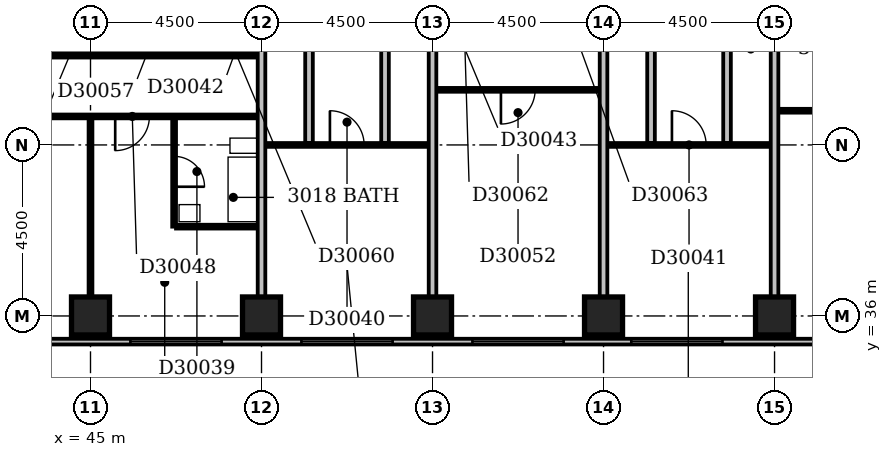
"""IFC4 building model, lengths in metres.
Left out: names, types, materials, properties, quantities, classifications, styles, units other than length and angle.
Written with IfcOpenShell. Run it as: python <this file> out.ifc"""

import sys

from ifc_helpers import new_model, si_unit, direction, frame, frame_2d, origin, origin_2d, place, context, subcontext, project, spatial, rectangle, extrude, element, fill, save


model = new_model("IFC4")
c1 = context("Model", 3, precision=1e-05, world=origin(), true_north=direction((0.0, 1.0)))
c2 = subcontext(c1, "Body", "Model", "MODEL_VIEW")
j1 = project(units=[si_unit("LENGTHUNIT", "METRE"), si_unit("PLANEANGLEUNIT", "RADIAN")], contexts=[c1])
p1 = place(None, origin())
s1 = spatial("IfcSite", under=j1, at=p1, CompositionType="ELEMENT")
p2 = place(p1, origin())
s2 = spatial("IfcBuilding", under=s1, at=p2, CompositionType="ELEMENT")
p3 = place(p2, frame((0.0, 0.0, 123.2)))
s3 = spatial("IfcBuildingStorey", under=s2, at=p3, CompositionType="ELEMENT", Elevation=123.2)
for number, where, z_axis, x_axis in (
    (1, (45.0, 36.0, -0.3), (0.0, 0.0, 1.0), (1.0, 0.0, 0.0)),
    (2, (49.5, 36.0, -0.3), (0.0, 0.0, 1.0), (1.0, 0.0, 0.0)),
    (3, (54.0, 36.0, -0.3), (0.0, 0.0, 1.0), (1.0, 0.0, 0.0)),
    (4, (58.5, 36.0, -0.3), (0.0, 0.0, 1.0), (1.0, 0.0, 0.0)),
    (5, (63.0, 36.0, -0.3), (0.0, 0.0, 1.0), (1.0, 0.0, 0.0)),
):
    element("IfcColumn", number, at=place(p3, frame(where, z_axis=z_axis, x_axis=x_axis)), inside=s3, PredefinedType="COLUMN", context=c2, shape_type="SweptSolid", body=[
        extrude(rectangle(XDim=1.0, YDim=1.0, at=origin_2d()), origin(), (0.0, 0.0, 1.0), 3.6),
    ])
p4 = place(p3, frame((23.1, 35.325, 0.0), z_axis=(0.0, 0.0, 1.0), x_axis=(1.0, 0.0, 0.0)))
e6 = element("IfcWall", 6, at=p4, inside=s3, PredefinedType="STANDARD", context=c2, shape_type="SweptSolid", body=[
    extrude(rectangle(XDim=45.15, YDim=0.15, at=frame_2d((22.575, 0.0))), origin(), (0.0, 0.0, 1.0), 2.7),
])
p5 = place(p4, frame((0.45, 0.0, 0.6)))
e7 = element("IfcOpeningElement", 7, at=p5, cuts=e6, PredefinedType="OPENING", context=c2, shape_type="SweptSolid", body=[
    extrude(rectangle(XDim=2.4, YDim=1.8, at=frame_2d((1.2, 0.9))), frame((0.0, 0.087, 0.0), z_axis=(0.0, -1.0, 0.0), x_axis=(1.0, 0.0, 0.0)), (0.0, 0.0, 1.0), 0.174),
])
p6 = place(p4, frame((4.95, 0.0, 0.6)))
e8 = element("IfcOpeningElement", 8, at=p6, cuts=e6, PredefinedType="OPENING", context=c2, shape_type="SweptSolid", body=[
    extrude(rectangle(XDim=2.4, YDim=1.8, at=frame_2d((1.2, 0.9))), frame((0.0, 0.087, 0.0), z_axis=(0.0, -1.0, 0.0), x_axis=(1.0, 0.0, 0.0)), (0.0, 0.0, 1.0), 0.174),
])
p7 = place(p4, frame((10.598, 0.0, 0.6)))
e9 = element("IfcOpeningElement", 9, at=p7, cuts=e6, PredefinedType="OPENING", context=c2, shape_type="SweptSolid", body=[
    extrude(rectangle(XDim=1.5, YDim=1.8, at=frame_2d((0.75, 0.9))), frame((0.0, 0.087, 0.0), z_axis=(0.0, -1.0, 0.0), x_axis=(1.0, 0.0, 0.0)), (0.0, 0.0, 1.0), 0.174),
])
p8 = place(p4, frame((13.66, 0.0, 0.6)))
e10 = element("IfcOpeningElement", 10, at=p8, cuts=e6, PredefinedType="OPENING", context=c2, shape_type="SweptSolid", body=[
    extrude(rectangle(XDim=1.8, YDim=1.8, at=frame_2d((0.9, 0.9))), frame((0.0, 0.087, 0.0), z_axis=(0.0, -1.0, 0.0), x_axis=(1.0, 0.0, 0.0)), (0.0, 0.0, 1.0), 0.174),
])
p9 = place(p4, frame((18.45, 0.0, 0.6)))
e11 = element("IfcOpeningElement", 11, at=p9, cuts=e6, PredefinedType="OPENING", context=c2, shape_type="SweptSolid", body=[
    extrude(rectangle(XDim=2.4, YDim=1.8, at=frame_2d((1.2, 0.9))), frame((0.0, 0.087, 0.0), z_axis=(0.0, -1.0, 0.0), x_axis=(1.0, 0.0, 0.0)), (0.0, 0.0, 1.0), 0.174),
])
p10 = place(p4, frame((22.95, 0.0, 0.6)))
e12 = element("IfcOpeningElement", 12, at=p10, cuts=e6, PredefinedType="OPENING", context=c2, shape_type="SweptSolid", body=[
    extrude(rectangle(XDim=2.4, YDim=1.8, at=frame_2d((1.2, 0.9))), frame((0.0, 0.087, 0.0), z_axis=(0.0, -1.0, 0.0), x_axis=(1.0, 0.0, 0.0)), (0.0, 0.0, 1.0), 0.174),
])
p11 = place(p4, frame((27.45, 0.0, 0.6)))
e13 = element("IfcOpeningElement", 13, at=p11, cuts=e6, PredefinedType="OPENING", context=c2, shape_type="SweptSolid", body=[
    extrude(rectangle(XDim=2.4, YDim=1.8, at=frame_2d((1.2, 0.9))), frame((0.0, 0.087, 0.0), z_axis=(0.0, -1.0, 0.0), x_axis=(1.0, 0.0, 0.0)), (0.0, 0.0, 1.0), 0.174),
])
p12 = place(p4, frame((31.95, 0.0, 0.6)))
e14 = element("IfcOpeningElement", 14, at=p12, cuts=e6, PredefinedType="OPENING", context=c2, shape_type="SweptSolid", body=[
    extrude(rectangle(XDim=2.4, YDim=1.8, at=frame_2d((1.2, 0.9))), frame((0.0, 0.087, 0.0), z_axis=(0.0, -1.0, 0.0), x_axis=(1.0, 0.0, 0.0)), (0.0, 0.0, 1.0), 0.174),
])
p13 = place(p4, frame((36.131, 0.0, 0.6)))
e15 = element("IfcOpeningElement", 15, at=p13, cuts=e6, PredefinedType="OPENING", context=c2, shape_type="SweptSolid", body=[
    extrude(rectangle(XDim=2.4, YDim=1.8, at=frame_2d((1.2, 0.9))), frame((0.0, 0.087, 0.0), z_axis=(0.0, -1.0, 0.0), x_axis=(1.0, 0.0, 0.0)), (0.0, 0.0, 1.0), 0.174),
])
p14 = place(p4, frame((40.95, 0.0, 0.6)))
e16 = element("IfcOpeningElement", 16, at=p14, cuts=e6, PredefinedType="OPENING", context=c2, shape_type="SweptSolid", body=[
    extrude(rectangle(XDim=2.4, YDim=1.8, at=frame_2d((1.2, 0.9))), frame((0.0, 0.087, 0.0), z_axis=(0.0, -1.0, 0.0), x_axis=(1.0, 0.0, 0.0)), (0.0, 0.0, 1.0), 0.174),
])
p15 = place(p3, frame((45.0, 36.5, 0.0), z_axis=(0.0, 0.0, 1.0), x_axis=(0.0, 1.0, 0.0)))
e17 = element("IfcWall", 17, at=p15, inside=s3, PredefinedType="PARTITIONING", context=c2, shape_type="SweptSolid", body=[
    extrude(rectangle(XDim=4.7, YDim=0.1, at=frame_2d((2.35, 0.0))), origin(), (0.0, 0.0, 1.0), 2.6),
])
p16 = place(p3, frame((49.5, 36.5, 0.0), z_axis=(0.0, 0.0, 1.0), x_axis=(0.0, 1.0, 0.0)))
e18 = element("IfcWall", 18, at=p16, inside=s3, PredefinedType="PARTITIONING", context=c2, shape_type="SweptSolid", body=[
    extrude(rectangle(XDim=12.9, YDim=0.2, at=frame_2d((6.45, 0.0))), origin(), (0.0, 0.0, 1.0), 3.3),
])
p17 = place(p3, frame((54.0, 36.5, 0.0), z_axis=(0.0, 0.0, 1.0), x_axis=(0.0, 1.0, 0.0)))
e19 = element("IfcWall", 19, at=p17, inside=s3, PredefinedType="PARTITIONING", context=c2, shape_type="SweptSolid", body=[
    extrude(rectangle(XDim=12.9, YDim=0.2, at=frame_2d((6.45, 0.0))), origin(), (0.0, 0.0, 1.0), 2.6),
])
p18 = place(p3, frame((58.5, 36.5, 0.0), z_axis=(0.0, 0.0, 1.0), x_axis=(0.0, 1.0, 0.0)))
e20 = element("IfcWall", 20, at=p18, inside=s3, PredefinedType="PARTITIONING", context=c2, shape_type="SweptSolid", body=[
    extrude(rectangle(XDim=12.9, YDim=0.2, at=frame_2d((6.45, 0.0))), origin(), (0.0, 0.0, 1.0), 3.3),
])
p19 = place(p3, frame((63.0, 36.5, 0.0), z_axis=(0.0, 0.0, 1.0), x_axis=(0.0, 1.0, 0.0)))
e21 = element("IfcWall", 21, at=p19, inside=s3, PredefinedType="PARTITIONING", context=c2, shape_type="SweptSolid", body=[
    extrude(rectangle(XDim=12.9, YDim=0.2, at=frame_2d((6.45, 0.0))), origin(), (0.0, 0.0, 1.0), 2.4),
])
p20 = place(p3, frame((47.2, 38.35, 0.0), z_axis=(0.0, 0.0, 1.0), x_axis=(0.0, 1.0, 0.0)))
e22 = element("IfcWall", 22, at=p20, inside=s3, PredefinedType="PLUMBINGWALL", context=c2, shape_type="SweptSolid", body=[
    extrude(rectangle(XDim=2.85, YDim=0.1, at=frame_2d((1.425, 0.0))), origin(), (0.0, 0.0, 1.0), 3.3),
])
p21 = place(p20, frame((1.05, 0.0, 0.0)))
e23 = element("IfcOpeningElement", 23, at=p21, cuts=e22, PredefinedType="OPENING", context=c2, shape_type="SweptSolid", body=[
    extrude(rectangle(XDim=0.8, YDim=2.1, at=frame_2d((0.4, 1.05))), frame((0.0, 0.062, 0.0), z_axis=(0.0, -1.0, 0.0), x_axis=(1.0, 0.0, 0.0)), (0.0, 0.0, 1.0), 0.124),
])
p22 = place(p3, frame((47.25, 38.35, 0.0), z_axis=(0.0, 0.0, 1.0), x_axis=(1.0, 0.0, 0.0)))
e24 = element("IfcWall", 24, at=p22, inside=s3, PredefinedType="PLUMBINGWALL", context=c2, shape_type="SweptSolid", body=[
    extrude(rectangle(XDim=2.15, YDim=0.1, at=frame_2d((1.075, 0.0))), origin(), (0.0, 0.0, 1.0), 3.3),
])
p23 = place(p3, frame((49.6, 40.5, 0.0), z_axis=(0.0, 0.0, 1.0), x_axis=(1.0, 0.0, 0.0)))
e25 = element("IfcWall", 25, at=p23, inside=s3, PredefinedType="PARTITIONING", context=c2, shape_type="SweptSolid", body=[
    extrude(rectangle(XDim=4.3, YDim=0.1, at=frame_2d((2.15, 0.0))), origin(), (0.0, 0.0, 1.0), 3.3),
])
p24 = place(p23, frame((1.7, 0.0, 0.0)))
e26 = element("IfcOpeningElement", 26, at=p24, cuts=e25, PredefinedType="OPENING", context=c2, shape_type="SweptSolid", body=[
    extrude(rectangle(XDim=0.9, YDim=2.1, at=frame_2d((0.45, 1.05))), frame((0.0, 0.062, 0.0), z_axis=(0.0, -1.0, 0.0), x_axis=(1.0, 0.0, 0.0)), (0.0, 0.0, 1.0), 0.124),
])
p25 = place(p3, frame((58.6, 40.5, 0.0), z_axis=(0.0, 0.0, 1.0), x_axis=(1.0, 0.0, 0.0)))
e27 = element("IfcWall", 27, at=p25, inside=s3, PredefinedType="PARTITIONING", context=c2, shape_type="SweptSolid", body=[
    extrude(rectangle(XDim=4.3, YDim=0.1, at=frame_2d((2.15, 0.0))), origin(), (0.0, 0.0, 1.0), 3.3),
])
p26 = place(p25, frame((1.7, 0.0, 0.0)))
e28 = element("IfcOpeningElement", 28, at=p26, cuts=e27, PredefinedType="OPENING", context=c2, shape_type="SweptSolid", body=[
    extrude(rectangle(XDim=0.9, YDim=2.1, at=frame_2d((0.45, 1.05))), frame((0.0, 0.062, 0.0), z_axis=(0.0, -1.0, 0.0), x_axis=(1.0, 0.0, 0.0)), (0.0, 0.0, 1.0), 0.124),
])
p27 = place(p3, frame((50.75, 40.55, 0.0), z_axis=(0.0, 0.0, 1.0), x_axis=(0.0, 1.0, 0.0)))
e29 = element("IfcWall", 29, at=p27, inside=s3, PredefinedType="PARTITIONING", context=c2, shape_type="SweptSolid", body=[
    extrude(rectangle(XDim=8.95, YDim=0.2, at=frame_2d((4.475, 0.0))), origin(), (0.0, 0.0, 1.0), 3.3),
])
p28 = place(p27, frame((5.55, 0.0, 0.0)))
e30 = element("IfcOpeningElement", 30, at=p28, cuts=e29, PredefinedType="OPENING", context=c2, shape_type="SweptSolid", body=[
    extrude(rectangle(XDim=0.8, YDim=2.1, at=frame_2d((0.4, 1.05))), frame((0.0, 0.112, 0.0), z_axis=(0.0, -1.0, 0.0), x_axis=(1.0, 0.0, 0.0)), (0.0, 0.0, 1.0), 0.224),
])
p29 = place(p3, frame((52.75, 40.55, 0.0), z_axis=(0.0, 0.0, 1.0), x_axis=(0.0, 1.0, 0.0)))
e31 = element("IfcWall", 31, at=p29, inside=s3, PredefinedType="PARTITIONING", context=c2, shape_type="SweptSolid", body=[
    extrude(rectangle(XDim=8.95, YDim=0.2, at=frame_2d((4.475, 0.0))), origin(), (0.0, 0.0, 1.0), 3.3),
])
p30 = place(p29, frame((5.55, 0.0, 0.0)))
e32 = element("IfcOpeningElement", 32, at=p30, cuts=e31, PredefinedType="OPENING", context=c2, shape_type="SweptSolid", body=[
    extrude(rectangle(XDim=0.8, YDim=2.1, at=frame_2d((0.4, 1.05))), frame((0.0, 0.112, 0.0), z_axis=(0.0, -1.0, 0.0), x_axis=(1.0, 0.0, 0.0)), (0.0, 0.0, 1.0), 0.224),
])
p31 = place(p3, frame((59.75, 40.55, 0.0), z_axis=(0.0, 0.0, 1.0), x_axis=(0.0, 1.0, 0.0)))
e33 = element("IfcWall", 33, at=p31, inside=s3, PredefinedType="PARTITIONING", context=c2, shape_type="SweptSolid", body=[
    extrude(rectangle(XDim=8.95, YDim=0.2, at=frame_2d((4.475, 0.0))), origin(), (0.0, 0.0, 1.0), 3.3),
])
p32 = place(p31, frame((5.55, 0.0, 0.0)))
e34 = element("IfcOpeningElement", 34, at=p32, cuts=e33, PredefinedType="OPENING", context=c2, shape_type="SweptSolid", body=[
    extrude(rectangle(XDim=0.8, YDim=2.1, at=frame_2d((0.4, 1.05))), frame((0.0, 0.112, 0.0), z_axis=(0.0, -1.0, 0.0), x_axis=(1.0, 0.0, 0.0)), (0.0, 0.0, 1.0), 0.224),
])
p33 = place(p3, frame((61.75, 40.55, 0.0), z_axis=(0.0, 0.0, 1.0), x_axis=(0.0, 1.0, 0.0)))
e35 = element("IfcWall", 35, at=p33, inside=s3, PredefinedType="PARTITIONING", context=c2, shape_type="SweptSolid", body=[
    extrude(rectangle(XDim=8.95, YDim=0.2, at=frame_2d((4.475, 0.0))), origin(), (0.0, 0.0, 1.0), 3.3),
])
p34 = place(p33, frame((5.55, 0.0, 0.0)))
e36 = element("IfcOpeningElement", 36, at=p34, cuts=e35, PredefinedType="OPENING", context=c2, shape_type="SweptSolid", body=[
    extrude(rectangle(XDim=0.8, YDim=2.1, at=frame_2d((0.4, 1.05))), frame((0.0, 0.112, 0.0), z_axis=(0.0, -1.0, 0.0), x_axis=(1.0, 0.0, 0.0)), (0.0, 0.0, 1.0), 0.224),
])
p35 = place(p3, frame((31.6, 41.25, 0.0), z_axis=(0.0, 0.0, 1.0), x_axis=(1.0, 0.0, 0.0)))
e37 = element("IfcWall", 37, at=p35, inside=s3, PredefinedType="PARTITIONING", context=c2, shape_type="SweptSolid", body=[
    extrude(rectangle(XDim=17.8, YDim=0.1, at=frame_2d((8.9, 0.0))), origin(), (0.0, 0.0, 1.0), 3.3),
])
p36 = place(p35, frame((2.85, 0.0, 0.0)))
e38 = element("IfcOpeningElement", 38, at=p36, cuts=e37, PredefinedType="OPENING", context=c2, shape_type="SweptSolid", body=[
    extrude(rectangle(XDim=0.9, YDim=2.1, at=frame_2d((0.45, 1.05))), frame((0.0, 0.062, 0.0), z_axis=(0.0, -1.0, 0.0), x_axis=(1.0, 0.0, 0.0)), (0.0, 0.0, 1.0), 0.124),
])
p37 = place(p35, frame((8.4, 0.0, 0.0)))
e39 = element("IfcOpeningElement", 39, at=p37, cuts=e37, PredefinedType="OPENING", context=c2, shape_type="SweptSolid", body=[
    extrude(rectangle(XDim=0.9, YDim=2.1, at=frame_2d((0.45, 1.05))), frame((0.0, 0.062, 0.0), z_axis=(0.0, -1.0, 0.0), x_axis=(1.0, 0.0, 0.0)), (0.0, 0.0, 1.0), 0.124),
])
p38 = place(p35, frame((14.05, 0.0, 0.0)))
e40 = element("IfcOpeningElement", 40, at=p38, cuts=e37, PredefinedType="OPENING", context=c2, shape_type="SweptSolid", body=[
    extrude(rectangle(XDim=0.9, YDim=2.1, at=frame_2d((0.45, 1.05))), frame((0.0, 0.062, 0.0), z_axis=(0.0, -1.0, 0.0), x_axis=(1.0, 0.0, 0.0)), (0.0, 0.0, 1.0), 0.124),
])
p39 = place(p3, frame((63.1, 41.4, 0.0), z_axis=(0.0, 0.0, 1.0), x_axis=(1.0, 0.0, 0.0)))
e41 = element("IfcWall", 41, at=p39, inside=s3, PredefinedType="PARTITIONING", context=c2, shape_type="SweptSolid", body=[
    extrude(rectangle(XDim=5.0, YDim=0.1, at=frame_2d((2.5, 0.0))), origin(), (0.0, 0.0, 1.0), 3.3),
])
p40 = place(p39, frame((1.7, 0.0, 0.0)))
e42 = element("IfcOpeningElement", 42, at=p40, cuts=e41, PredefinedType="OPENING", context=c2, shape_type="SweptSolid", body=[
    extrude(rectangle(XDim=0.9, YDim=2.1, at=frame_2d((0.45, 1.05))), frame((0.0, 0.062, 0.0), z_axis=(0.0, -1.0, 0.0), x_axis=(1.0, 0.0, 0.0)), (0.0, 0.0, 1.0), 0.124),
])
p41 = place(p3, frame((54.1, 41.95, 0.0), z_axis=(0.0, 0.0, 1.0), x_axis=(1.0, 0.0, 0.0)))
e43 = element("IfcWall", 43, at=p41, inside=s3, PredefinedType="PARTITIONING", context=c2, shape_type="SweptSolid", body=[
    extrude(rectangle(XDim=4.3, YDim=0.1, at=frame_2d((2.15, 0.0))), origin(), (0.0, 0.0, 1.0), 3.3),
])
p42 = place(p41, frame((1.7, 0.0, 0.0)))
e44 = element("IfcOpeningElement", 44, at=p42, cuts=e43, PredefinedType="OPENING", context=c2, shape_type="SweptSolid", body=[
    extrude(rectangle(XDim=0.9, YDim=2.1, at=frame_2d((0.45, 1.05))), frame((0.0, 0.062, 0.0), z_axis=(0.0, -1.0, 0.0), x_axis=(1.0, 0.0, 0.0)), (0.0, 0.0, 1.0), 0.124),
])
p43 = place(p3, frame((38.25, 42.85, 0.0), z_axis=(0.0, 0.0, 1.0), x_axis=(1.0, 0.0, 0.0)))
e45 = element("IfcWall", 45, at=p43, inside=s3, PredefinedType="PARTITIONING", context=c2, shape_type="SweptSolid", body=[
    extrude(rectangle(XDim=11.15, YDim=0.1, at=frame_2d((5.575, 0.0))), origin(), (0.0, 0.0, 1.0), 3.3),
])
p44 = place(p43, frame((0.75, 0.0, 0.0)))
e46 = element("IfcOpeningElement", 46, at=p44, cuts=e45, PredefinedType="OPENING", context=c2, shape_type="SweptSolid", body=[
    extrude(rectangle(XDim=0.8, YDim=2.1, at=frame_2d((0.4, 1.05))), frame((0.0, 0.062, 0.0), z_axis=(0.0, -1.0, 0.0), x_axis=(1.0, 0.0, 0.0)), (0.0, 0.0, 1.0), 0.124),
])
p45 = place(p43, frame((8.05, 0.0, 0.0)))
e47 = element("IfcOpeningElement", 47, at=p45, cuts=e45, PredefinedType="OPENING", context=c2, shape_type="SweptSolid", body=[
    extrude(rectangle(XDim=0.8, YDim=2.1, at=frame_2d((0.4, 1.05))), frame((0.0, 0.062, 0.0), z_axis=(0.0, -1.0, 0.0), x_axis=(1.0, 0.0, 0.0)), (0.0, 0.0, 1.0), 0.124),
])
p46 = place(p43, frame((4.25, 0.0, 0.0)))
e48 = element("IfcOpeningElement", 48, at=p46, cuts=e45, PredefinedType="OPENING", context=c2, shape_type="SweptSolid", body=[
    extrude(rectangle(XDim=0.8, YDim=2.1, at=frame_2d((0.4, 1.05))), frame((0.0, 0.062, 0.0), z_axis=(0.0, -1.0, 0.0), x_axis=(1.0, 0.0, 0.0)), (0.0, 0.0, 1.0), 0.124),
])
p47 = place(p43, frame((6.05, 0.0, 0.0)))
e49 = element("IfcOpeningElement", 49, at=p47, cuts=e45, PredefinedType="OPENING", context=c2, shape_type="SweptSolid", body=[
    extrude(rectangle(XDim=0.8, YDim=2.1, at=frame_2d((0.4, 1.05))), frame((0.0, 0.062, 0.0), z_axis=(0.0, -1.0, 0.0), x_axis=(1.0, 0.0, 0.0)), (0.0, 0.0, 1.0), 0.124),
])
p48 = place(p43, frame((9.95, 0.0, 0.0)))
e50 = element("IfcOpeningElement", 50, at=p48, cuts=e45, PredefinedType="OPENING", context=c2, shape_type="SweptSolid", body=[
    extrude(rectangle(XDim=0.8, YDim=2.1, at=frame_2d((0.4, 1.05))), frame((0.0, 0.062, 0.0), z_axis=(0.0, -1.0, 0.0), x_axis=(1.0, 0.0, 0.0)), (0.0, 0.0, 1.0), 0.124),
])
p49 = place(p43, frame((2.7, 0.0, 0.0)))
e51 = element("IfcOpeningElement", 51, at=p49, cuts=e45, PredefinedType="OPENING", context=c2, shape_type="SweptSolid", body=[
    extrude(rectangle(XDim=0.8, YDim=2.1, at=frame_2d((0.4, 1.05))), frame((0.0, 0.062, 0.0), z_axis=(0.0, -1.0, 0.0), x_axis=(1.0, 0.0, 0.0)), (0.0, 0.0, 1.0), 0.124),
])
p50 = place(p3, frame((45.7, 42.9, 0.0), z_axis=(0.0, 0.0, 1.0), x_axis=(0.0, 1.0, 0.0)))
e52 = element("IfcWall", 52, at=p50, inside=s3, PredefinedType="PARTITIONING", context=c2, shape_type="SweptSolid", body=[
    extrude(rectangle(XDim=6.5, YDim=0.1, at=frame_2d((3.25, 0.0))), origin(), (0.0, 0.0, 1.0), 2.6),
])
p51 = place(p3, frame((47.7, 42.9, 0.0), z_axis=(0.0, 0.0, 1.0), x_axis=(0.0, 1.0, 0.0)))
e53 = element("IfcWall", 53, at=p51, inside=s3, PredefinedType="PARTITIONING", context=c2, shape_type="SweptSolid", body=[
    extrude(rectangle(XDim=6.5, YDim=0.1, at=frame_2d((3.25, 0.0))), origin(), (0.0, 0.0, 1.0), 3.3),
])
p52 = place(p10, origin())
e54 = element("IfcWindow", 54, at=p52, inside=s3, PartitioningType="SINGLE_PANEL", PredefinedType="WINDOW", context=c2, shape_type="SweptSolid", body=[
    extrude(rectangle(XDim=2.4, YDim=1.8, at=frame_2d((1.2, 0.9))), frame((0.0, 0.03, 0.0), z_axis=(0.0, -1.0, 0.0), x_axis=(1.0, 0.0, 0.0)), (0.0, 0.0, 1.0), 0.06),
])
fill(e12, e54)
p53 = place(p11, origin())
e55 = element("IfcWindow", 55, at=p53, inside=s3, PartitioningType="SINGLE_PANEL", PredefinedType="WINDOW", context=c2, shape_type="SweptSolid", body=[
    extrude(rectangle(XDim=2.4, YDim=1.8, at=frame_2d((1.2, 0.9))), frame((0.0, 0.03, 0.0), z_axis=(0.0, -1.0, 0.0), x_axis=(1.0, 0.0, 0.0)), (0.0, 0.0, 1.0), 0.06),
])
fill(e13, e55)
p54 = place(p12, origin())
e56 = element("IfcWindow", 56, at=p54, inside=s3, PartitioningType="SINGLE_PANEL", PredefinedType="WINDOW", context=c2, shape_type="SweptSolid", body=[
    extrude(rectangle(XDim=2.4, YDim=1.8, at=frame_2d((1.2, 0.9))), frame((0.0, 0.03, 0.0), z_axis=(0.0, -1.0, 0.0), x_axis=(1.0, 0.0, 0.0)), (0.0, 0.0, 1.0), 0.06),
])
fill(e14, e56)
p55 = place(p13, origin())
e57 = element("IfcWindow", 57, at=p55, inside=s3, PartitioningType="SINGLE_PANEL", PredefinedType="WINDOW", context=c2, shape_type="SweptSolid", body=[
    extrude(rectangle(XDim=2.4, YDim=1.8, at=frame_2d((1.2, 0.9))), frame((0.0, 0.03, 0.0), z_axis=(0.0, -1.0, 0.0), x_axis=(1.0, 0.0, 0.0)), (0.0, 0.0, 1.0), 0.06),
])
fill(e15, e57)
p56 = place(p21, frame((0.8, 0.0, 0.0), z_axis=(0.0, 0.0, 1.0), x_axis=(-1.0, 0.0, 0.0)))
e58 = element("IfcDoor", 58, at=p56, inside=s3, OperationType="SINGLE_SWING_RIGHT", PredefinedType="DOOR", context=c2, shape_type="SweptSolid", body=[
    extrude(rectangle(XDim=0.8, YDim=2.1, at=frame_2d((0.4, 1.05))), frame((0.0, 0.025, 0.0), z_axis=(0.0, -1.0, 0.0), x_axis=(1.0, 0.0, 0.0)), (0.0, 0.0, 1.0), 0.05),
])
fill(e23, e58)
p57 = place(p24, origin())
e59 = element("IfcDoor", 59, at=p57, inside=s3, OperationType="SINGLE_SWING_LEFT", PredefinedType="DOOR", context=c2, shape_type="SweptSolid", body=[
    extrude(rectangle(XDim=0.9, YDim=2.1, at=frame_2d((0.45, 1.05))), frame((0.0, 0.025, 0.0), z_axis=(0.0, -1.0, 0.0), x_axis=(1.0, 0.0, 0.0)), (0.0, 0.0, 1.0), 0.05),
])
fill(e26, e59)
p58 = place(p26, origin())
e60 = element("IfcDoor", 60, at=p58, inside=s3, OperationType="SINGLE_SWING_LEFT", PredefinedType="DOOR", context=c2, shape_type="SweptSolid", body=[
    extrude(rectangle(XDim=0.9, YDim=2.1, at=frame_2d((0.45, 1.05))), frame((0.0, 0.025, 0.0), z_axis=(0.0, -1.0, 0.0), x_axis=(1.0, 0.0, 0.0)), (0.0, 0.0, 1.0), 0.05),
])
fill(e28, e60)
p59 = place(p38, frame((0.9, 0.0, 0.0), z_axis=(0.0, 0.0, 1.0), x_axis=(-1.0, 0.0, 0.0)))
e61 = element("IfcDoor", 61, at=p59, inside=s3, OperationType="SINGLE_SWING_RIGHT", PredefinedType="DOOR", context=c2, shape_type="SweptSolid", body=[
    extrude(rectangle(XDim=0.9, YDim=2.1, at=frame_2d((0.45, 1.05))), frame((0.0, 0.025, 0.0), z_axis=(0.0, -1.0, 0.0), x_axis=(1.0, 0.0, 0.0)), (0.0, 0.0, 1.0), 0.05),
])
fill(e40, e61)
p60 = place(p42, frame((0.9, 0.0, 0.0), z_axis=(0.0, 0.0, 1.0), x_axis=(-1.0, 0.0, 0.0)))
e62 = element("IfcDoor", 62, at=p60, inside=s3, OperationType="SINGLE_SWING_RIGHT", PredefinedType="DOOR", context=c2, shape_type="SweptSolid", body=[
    extrude(rectangle(XDim=0.9, YDim=2.1, at=frame_2d((0.45, 1.05))), frame((0.0, 0.025, 0.0), z_axis=(0.0, -1.0, 0.0), x_axis=(1.0, 0.0, 0.0)), (0.0, 0.0, 1.0), 0.05),
])
fill(e44, e62)
p61 = place(p45, origin())
e63 = element("IfcDoor", 63, at=p61, inside=s3, OperationType="SINGLE_SWING_LEFT", PredefinedType="DOOR", context=c2, shape_type="SweptSolid", body=[
    extrude(rectangle(XDim=0.8, YDim=2.1, at=frame_2d((0.4, 1.05))), frame((0.0, 0.025, 0.0), z_axis=(0.0, -1.0, 0.0), x_axis=(1.0, 0.0, 0.0)), (0.0, 0.0, 1.0), 0.05),
])
fill(e47, e63)
p62 = place(p47, origin())
e64 = element("IfcDoor", 64, at=p62, inside=s3, OperationType="SINGLE_SWING_LEFT", PredefinedType="DOOR", context=c2, shape_type="SweptSolid", body=[
    extrude(rectangle(XDim=0.8, YDim=2.1, at=frame_2d((0.4, 1.05))), frame((0.0, 0.025, 0.0), z_axis=(0.0, -1.0, 0.0), x_axis=(1.0, 0.0, 0.0)), (0.0, 0.0, 1.0), 0.05),
])
fill(e49, e64)
p63 = place(p48, origin())
e65 = element("IfcDoor", 65, at=p63, inside=s3, OperationType="SINGLE_SWING_LEFT", PredefinedType="DOOR", context=c2, shape_type="SweptSolid", body=[
    extrude(rectangle(XDim=0.8, YDim=2.1, at=frame_2d((0.4, 1.05))), frame((0.0, 0.025, 0.0), z_axis=(0.0, -1.0, 0.0), x_axis=(1.0, 0.0, 0.0)), (0.0, 0.0, 1.0), 0.05),
])
fill(e50, e65)
save(model, sys.argv[1])
